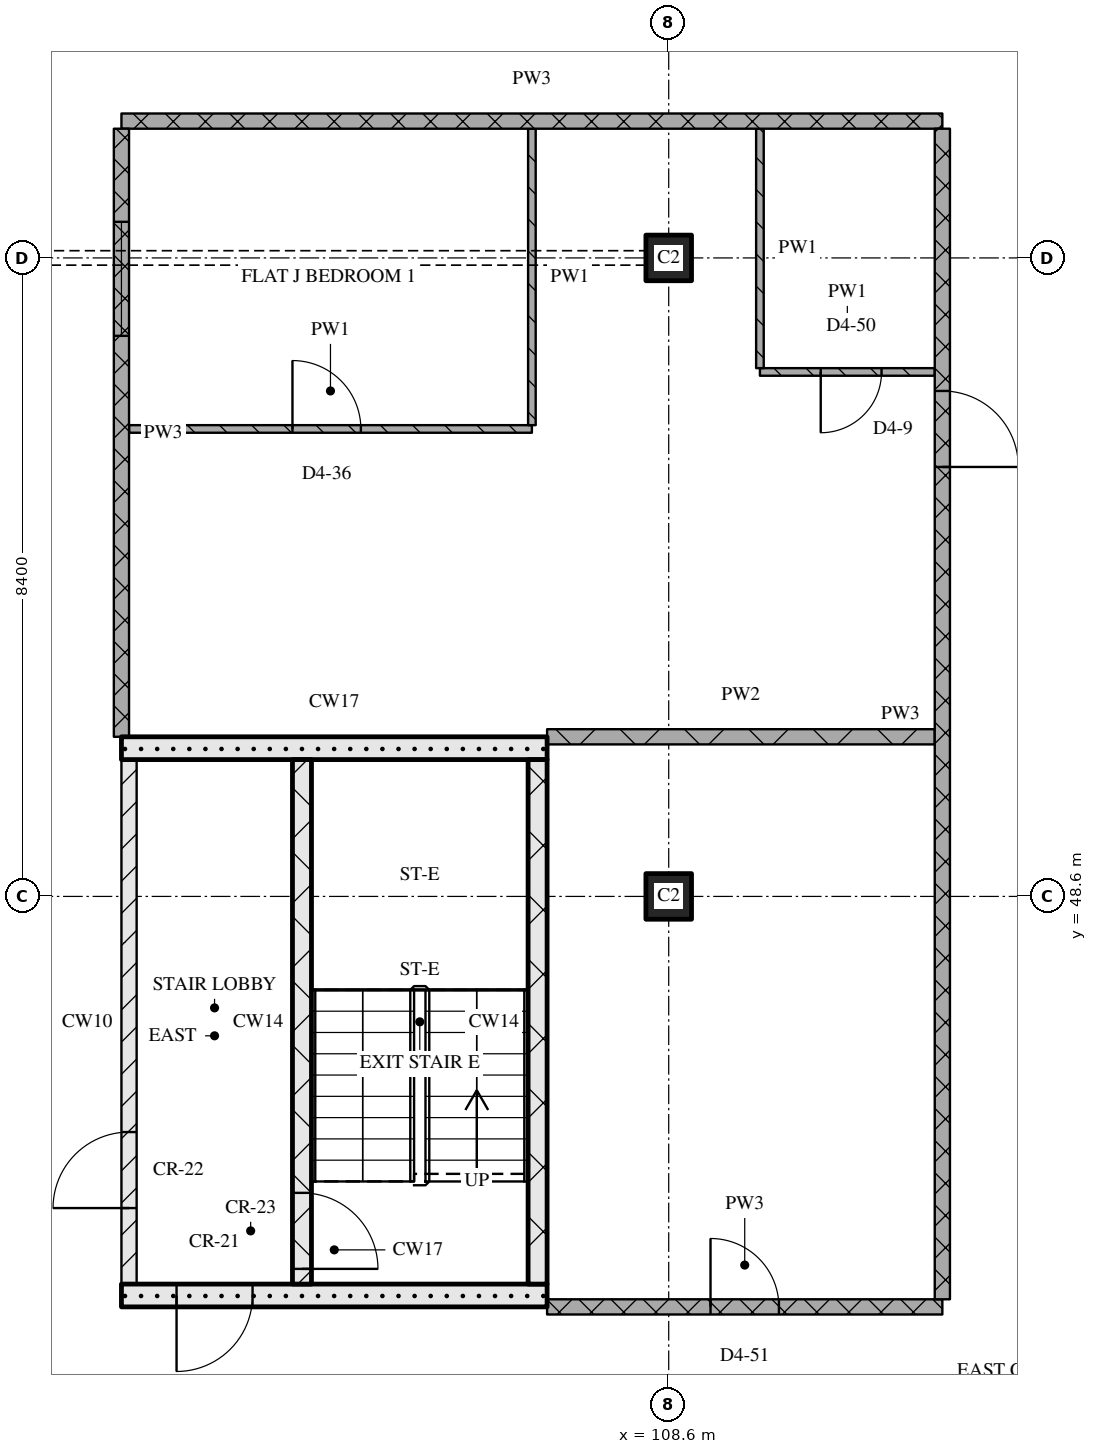
"""IFC4 building model, lengths in metres.
Left out: names, types, materials, properties, quantities, classifications, styles, units other than length and angle.
Written with IfcOpenShell. Run it as: python <this file> out.ifc"""

import sys

from ifc_helpers import new_model, si_unit, direction, frame, frame_2d, origin, origin_2d, place, context, subcontext, project, spatial, rectangle, extrude, element, fill, save


model = new_model("IFC4")
c1 = context("Model", 3, precision=1e-05, world=origin(), true_north=direction((0.0, 1.0)))
c2 = subcontext(c1, "Body", "Model", "MODEL_VIEW")
j1 = project(units=[si_unit("LENGTHUNIT", "METRE"), si_unit("PLANEANGLEUNIT", "RADIAN")], contexts=[c1])
p1 = place(None, origin())
s1 = spatial("IfcSite", under=j1, at=p1, CompositionType="ELEMENT")
p2 = place(p1, origin())
s2 = spatial("IfcBuilding", under=s1, at=p2, CompositionType="ELEMENT")
p3 = place(p2, frame((0.0, 0.0, 245.1)))
s3 = spatial("IfcBuildingStorey", under=s2, at=p3, CompositionType="ELEMENT", Elevation=245.1)
for number, where, z_axis, x_axis in (
    (1, (108.6, 48.6, 0.0), (0.0, 0.0, 1.0), (1.0, 0.0, 0.0)),
    (2, (108.6, 57.0, 0.0), (0.0, 0.0, 1.0), (1.0, 0.0, 0.0)),
):
    element("IfcColumn", number, at=place(p3, frame(where, z_axis=z_axis, x_axis=x_axis)), inside=s3, PredefinedType="COLUMN", context=c2, shape_type="SweptSolid", body=[
        extrude(rectangle(XDim=0.6, YDim=0.6, at=origin_2d()), origin(), (0.0, 0.0, 1.0), 3.6),
    ])
p4 = place(p3, frame((101.4, 43.35, 0.0), z_axis=(0.0, 0.0, 1.0), x_axis=(1.0, 0.0, 0.0)))
e3 = element("IfcWall", 3, at=p4, inside=s3, PredefinedType="SOLIDWALL", context=c2, shape_type="SweptSolid", body=[
    extrude(rectangle(XDim=5.6, YDim=0.3, at=frame_2d((2.8, 0.0))), origin(), (0.0, 0.0, 1.0), 3.32),
])
p5 = place(p4, frame((0.725, 0.0, 0.0)))
e4 = element("IfcOpeningElement", 4, at=p5, cuts=e3, PredefinedType="OPENING", context=c2, shape_type="SweptSolid", body=[
    extrude(rectangle(XDim=1.0, YDim=2.1, at=frame_2d((0.5, 1.05))), frame((0.0, 0.16, 0.0), z_axis=(0.0, -1.0, 0.0), x_axis=(1.0, 0.0, 0.0)), (0.0, 0.0, 1.0), 0.32),
])
p6 = place(p3, frame((101.5, 43.5, 0.0), z_axis=(0.0, 0.0, 1.0), x_axis=(0.0, 1.0, 0.0)))
e5 = element("IfcWall", 5, at=p6, inside=s3, PredefinedType="PARTITIONING", context=c2, shape_type="SweptSolid", body=[
    extrude(rectangle(XDim=6.9, YDim=0.2, at=frame_2d((3.45, 0.0))), origin(), (0.0, 0.0, 1.0), 3.32),
])
p7 = place(p6, frame((1.0, 0.0, 0.0)))
e6 = element("IfcOpeningElement", 6, at=p7, cuts=e5, PredefinedType="OPENING", context=c2, shape_type="SweptSolid", body=[
    extrude(rectangle(XDim=1.0, YDim=2.1, at=frame_2d((0.5, 1.05))), frame((0.0, 0.11, 0.0), z_axis=(0.0, -1.0, 0.0), x_axis=(1.0, 0.0, 0.0)), (0.0, 0.0, 1.0), 0.22),
])
p8 = place(p3, frame((103.775, 43.5, 0.0), z_axis=(0.0, 0.0, 1.0), x_axis=(0.0, 1.0, 0.0)))
e7 = element("IfcWall", 7, at=p8, inside=s3, PredefinedType="SOLIDWALL", context=c2, shape_type="SweptSolid", body=[
    extrude(rectangle(XDim=6.9, YDim=0.25, at=frame_2d((3.45, 0.0))), origin(), (0.0, 0.0, 1.0), 3.32),
])
p9 = place(p8, frame((0.2, 0.0, 0.0)))
e8 = element("IfcOpeningElement", 8, at=p9, cuts=e7, PredefinedType="OPENING", context=c2, shape_type="SweptSolid", body=[
    extrude(rectangle(XDim=1.0, YDim=2.1, at=frame_2d((0.5, 1.05))), frame((0.0, 0.135, 0.0), z_axis=(0.0, -1.0, 0.0), x_axis=(1.0, 0.0, 0.0)), (0.0, 0.0, 1.0), 0.27),
])
p10 = place(p3, frame((106.875, 43.5, 0.0), z_axis=(0.0, 0.0, 1.0), x_axis=(0.0, 1.0, 0.0)))
e9 = element("IfcWall", 9, at=p10, inside=s3, PredefinedType="SOLIDWALL", context=c2, shape_type="SweptSolid", body=[
    extrude(rectangle(XDim=6.9, YDim=0.25, at=frame_2d((3.45, 0.0))), origin(), (0.0, 0.0, 1.0), 3.32),
])
p11 = place(p3, frame((101.4, 50.55, 0.0), z_axis=(0.0, 0.0, 1.0), x_axis=(1.0, 0.0, 0.0)))
e10 = element("IfcWall", 10, at=p11, inside=s3, PredefinedType="SOLIDWALL", context=c2, shape_type="SweptSolid", body=[
    extrude(rectangle(XDim=5.6, YDim=0.3, at=frame_2d((2.8, 0.0))), origin(), (0.0, 0.0, 1.0), 3.32),
])
p12 = place(p3, frame((107.0, 43.2, 0.0), z_axis=(0.0, 0.0, 1.0), x_axis=(1.0, 0.0, 0.0)))
e11 = element("IfcWall", 11, at=p12, inside=s3, PredefinedType="PARTITIONING", context=c2, shape_type="SweptSolid", body=[
    extrude(rectangle(XDim=5.2, YDim=0.2, at=frame_2d((2.6, 0.0))), origin(), (0.0, 0.0, 1.0), 3.32),
])
p13 = place(p12, frame((2.15, 0.0, 0.0)))
e12 = element("IfcOpeningElement", 12, at=p13, cuts=e11, PredefinedType="OPENING", context=c2, shape_type="SweptSolid", body=[
    extrude(rectangle(XDim=0.9, YDim=2.1, at=frame_2d((0.45, 1.05))), frame((0.0, 0.11, 0.0), z_axis=(0.0, -1.0, 0.0), x_axis=(1.0, 0.0, 0.0)), (0.0, 0.0, 1.0), 0.22),
])
p14 = place(p3, frame((107.0, 50.7, 0.0), z_axis=(0.0, 0.0, 1.0), x_axis=(1.0, 0.0, 0.0)))
e13 = element("IfcWall", 13, at=p14, inside=s3, PredefinedType="PARTITIONING", context=c2, shape_type="SweptSolid", body=[
    extrude(rectangle(XDim=5.1, YDim=0.2, at=frame_2d((2.55, 0.0))), origin(), (0.0, 0.0, 1.0), 3.32),
])
p15 = place(p3, frame((101.5, 54.75, 0.0), z_axis=(0.0, 0.0, 1.0), x_axis=(1.0, 0.0, 0.0)))
e14 = element("IfcWall", 14, at=p15, inside=s3, PredefinedType="PARTITIONING", context=c2, shape_type="SweptSolid", body=[
    extrude(rectangle(XDim=5.3, YDim=0.1, at=frame_2d((2.65, 0.0))), origin(), (0.0, 0.0, 1.0), 3.32),
])
p16 = place(p15, frame((2.15, 0.0, 0.0)))
e15 = element("IfcOpeningElement", 15, at=p16, cuts=e14, PredefinedType="OPENING", context=c2, shape_type="SweptSolid", body=[
    extrude(rectangle(XDim=0.9, YDim=2.1, at=frame_2d((0.45, 1.05))), frame((0.0, 0.06, 0.0), z_axis=(0.0, -1.0, 0.0), x_axis=(1.0, 0.0, 0.0)), (0.0, 0.0, 1.0), 0.12),
])
p17 = place(p3, frame((109.8, 55.5, 0.0), z_axis=(0.0, 0.0, 1.0), x_axis=(1.0, 0.0, 0.0)))
e16 = element("IfcWall", 16, at=p17, inside=s3, PredefinedType="PARTITIONING", context=c2, shape_type="SweptSolid", body=[
    extrude(rectangle(XDim=2.3, YDim=0.1, at=frame_2d((1.15, 0.0))), origin(), (0.0, 0.0, 1.0), 3.32),
])
p18 = place(p17, frame((0.8, 0.0, 0.0)))
e17 = element("IfcOpeningElement", 17, at=p18, cuts=e16, PredefinedType="OPENING", context=c2, shape_type="SweptSolid", body=[
    extrude(rectangle(XDim=0.8, YDim=2.1, at=frame_2d((0.4, 1.05))), frame((0.0, 0.06, 0.0), z_axis=(0.0, -1.0, 0.0), x_axis=(1.0, 0.0, 0.0)), (0.0, 0.0, 1.0), 0.12),
])
p19 = place(p3, frame((101.4, 58.8, 0.0), z_axis=(0.0, 0.0, 1.0), x_axis=(1.0, 0.0, 0.0)))
e18 = element("IfcWall", 18, at=p19, inside=s3, PredefinedType="PARTITIONING", context=c2, shape_type="SweptSolid", body=[
    extrude(rectangle(XDim=10.8, YDim=0.2, at=frame_2d((5.4, 0.0))), origin(), (0.0, 0.0, 1.0), 3.32),
])
p20 = place(p3, frame((101.4, 58.7, 0.0), z_axis=(0.0, 0.0, 1.0), x_axis=(0.0, -1.0, 0.0)))
e19 = element("IfcWall", 19, at=p20, inside=s3, PredefinedType="PARTITIONING", context=c2, shape_type="SweptSolid", body=[
    extrude(rectangle(XDim=8.0, YDim=0.2, at=frame_2d((4.0, 0.0))), origin(), (0.0, 0.0, 1.0), 3.32),
])
p21 = place(p20, frame((1.225, 0.0, 0.9)))
e20 = element("IfcOpeningElement", 20, at=p21, cuts=e19, PredefinedType="OPENING", context=c2, shape_type="SweptSolid", body=[
    extrude(rectangle(XDim=1.5, YDim=1.5, at=frame_2d((0.75, 0.75))), frame((0.0, 0.11, 0.0), z_axis=(0.0, -1.0, 0.0), x_axis=(1.0, 0.0, 0.0)), (0.0, 0.0, 1.0), 0.22),
])
p22 = place(p3, frame((106.8, 58.7, 0.0), z_axis=(0.0, 0.0, 1.0), x_axis=(0.0, -1.0, 0.0)))
e21 = element("IfcWall", 21, at=p22, inside=s3, PredefinedType="PARTITIONING", context=c2, shape_type="SweptSolid", body=[
    extrude(rectangle(XDim=3.9, YDim=0.1, at=frame_2d((1.95, 0.0))), origin(), (0.0, 0.0, 1.0), 3.32),
])
p23 = place(p3, frame((109.8, 58.7, 0.0), z_axis=(0.0, 0.0, 1.0), x_axis=(0.0, -1.0, 0.0)))
e22 = element("IfcWall", 22, at=p23, inside=s3, PredefinedType="PARTITIONING", context=c2, shape_type="SweptSolid", body=[
    extrude(rectangle(XDim=3.15, YDim=0.1, at=frame_2d((1.575, 0.0))), origin(), (0.0, 0.0, 1.0), 3.32),
])
p24 = place(p3, frame((112.2, 43.3, 0.0), z_axis=(0.0, 0.0, 1.0), x_axis=(0.0, 1.0, 0.0)))
e23 = element("IfcWall", 23, at=p24, inside=s3, PredefinedType="PARTITIONING", context=c2, shape_type="SweptSolid", body=[
    extrude(rectangle(XDim=15.4, YDim=0.2, at=frame_2d((7.7, 0.0))), origin(), (0.0, 0.0, 1.0), 3.32),
])
p25 = place(p24, frame((10.95, 0.0, 0.0)))
e24 = element("IfcOpeningElement", 24, at=p25, cuts=e23, PredefinedType="OPENING", context=c2, shape_type="SweptSolid", body=[
    extrude(rectangle(XDim=1.0, YDim=2.1, at=frame_2d((0.5, 1.05))), frame((0.0, 0.11, 0.0), z_axis=(0.0, -1.0, 0.0), x_axis=(1.0, 0.0, 0.0)), (0.0, 0.0, 1.0), 0.22),
])
p26 = place(p5, origin())
e25 = element("IfcDoor", 25, at=p26, inside=s3, OperationType="SINGLE_SWING_RIGHT", PredefinedType="DOOR", context=c2, shape_type="SweptSolid", body=[
    extrude(rectangle(XDim=1.0, YDim=2.1, at=frame_2d((0.5, 1.05))), frame((0.0, 0.025, 0.0), z_axis=(0.0, -1.0, 0.0), x_axis=(1.0, 0.0, 0.0)), (0.0, 0.0, 1.0), 0.05),
])
fill(e4, e25)
p27 = place(p9, origin())
e26 = element("IfcDoor", 26, at=p27, inside=s3, OperationType="SINGLE_SWING_RIGHT", PredefinedType="DOOR", context=c2, shape_type="SweptSolid", body=[
    extrude(rectangle(XDim=1.0, YDim=2.1, at=frame_2d((0.5, 1.05))), frame((0.0, 0.025, 0.0), z_axis=(0.0, -1.0, 0.0), x_axis=(1.0, 0.0, 0.0)), (0.0, 0.0, 1.0), 0.05),
])
fill(e8, e26)
p28 = place(p7, origin())
e27 = element("IfcDoor", 27, at=p28, inside=s3, OperationType="SINGLE_SWING_LEFT", PredefinedType="DOOR", context=c2, shape_type="SweptSolid", body=[
    extrude(rectangle(XDim=1.0, YDim=2.1, at=frame_2d((0.5, 1.05))), frame((0.0, 0.025, 0.0), z_axis=(0.0, -1.0, 0.0), x_axis=(1.0, 0.0, 0.0)), (0.0, 0.0, 1.0), 0.05),
])
fill(e6, e27)
p29 = place(p13, origin())
e28 = element("IfcDoor", 28, at=p29, inside=s3, OperationType="SINGLE_SWING_LEFT", PredefinedType="DOOR", context=c2, shape_type="SweptSolid", body=[
    extrude(rectangle(XDim=0.9, YDim=2.1, at=frame_2d((0.45, 1.05))), frame((0.0, 0.025, 0.0), z_axis=(0.0, -1.0, 0.0), x_axis=(1.0, 0.0, 0.0)), (0.0, 0.0, 1.0), 0.05),
])
fill(e12, e28)
p30 = place(p16, origin())
e29 = element("IfcDoor", 29, at=p30, inside=s3, OperationType="SINGLE_SWING_LEFT", PredefinedType="DOOR", context=c2, shape_type="SweptSolid", body=[
    extrude(rectangle(XDim=0.9, YDim=2.1, at=frame_2d((0.45, 1.05))), frame((0.0, 0.025, 0.0), z_axis=(0.0, -1.0, 0.0), x_axis=(1.0, 0.0, 0.0)), (0.0, 0.0, 1.0), 0.05),
])
fill(e15, e29)
p31 = place(p18, origin())
e30 = element("IfcDoor", 30, at=p31, inside=s3, OperationType="SINGLE_SWING_RIGHT", PredefinedType="DOOR", context=c2, shape_type="SweptSolid", body=[
    extrude(rectangle(XDim=0.8, YDim=2.1, at=frame_2d((0.4, 1.05))), frame((0.0, 0.025, 0.0), z_axis=(0.0, -1.0, 0.0), x_axis=(1.0, 0.0, 0.0)), (0.0, 0.0, 1.0), 0.05),
])
fill(e17, e30)
p32 = place(p25, origin())
e31 = element("IfcDoor", 31, at=p32, inside=s3, OperationType="SINGLE_SWING_RIGHT", PredefinedType="DOOR", context=c2, shape_type="SweptSolid", body=[
    extrude(rectangle(XDim=1.0, YDim=2.1, at=frame_2d((0.5, 1.05))), frame((0.0, 0.025, 0.0), z_axis=(0.0, -1.0, 0.0), x_axis=(1.0, 0.0, 0.0)), (0.0, 0.0, 1.0), 0.05),
])
fill(e24, e31)
p33 = place(p21, origin())
e32 = element("IfcWindow", 32, at=p33, inside=s3, PartitioningType="SINGLE_PANEL", PredefinedType="WINDOW", context=c2, shape_type="SweptSolid", body=[
    extrude(rectangle(XDim=1.5, YDim=1.5, at=frame_2d((0.75, 0.75))), frame((0.0, 0.03, 0.0), z_axis=(0.0, -1.0, 0.0), x_axis=(1.0, 0.0, 0.0)), (0.0, 0.0, 1.0), 0.06),
])
fill(e20, e32)
save(model, sys.argv[1])
